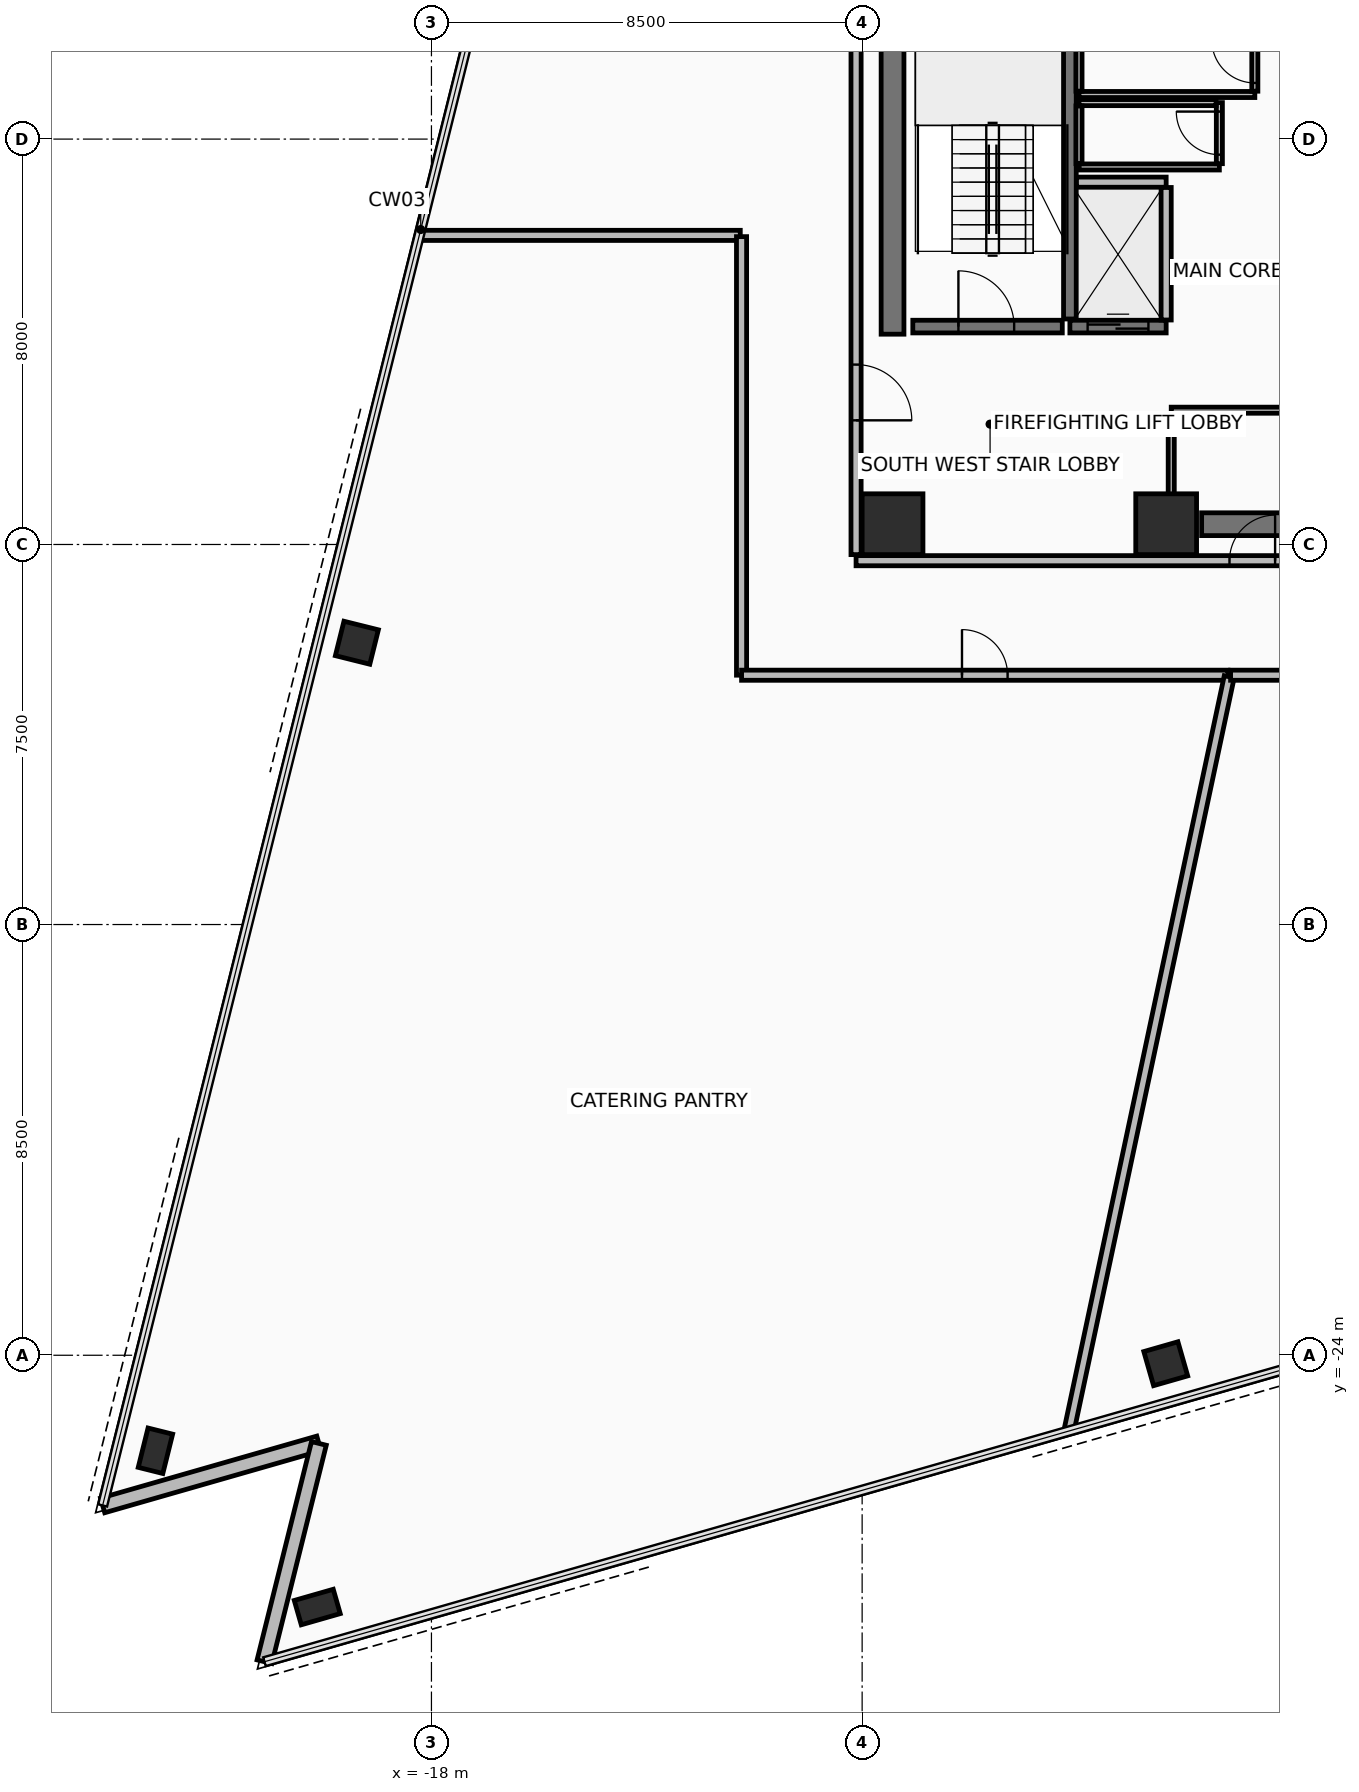
"""IFC4 building model, lengths in metres.
Left out: names, types, materials, properties, quantities, classifications, styles, units other than length and angle.
Written with IfcOpenShell. Run it as: python <this file> out.ifc"""

import sys

from ifc_helpers import new_model, si_unit, direction, frame, frame_2d, origin, origin_2d, place, context, subcontext, project, spatial, rectangle, hollow_rectangle, extrude, element, fill, save


model = new_model("IFC4")
c1 = context("Model", 3, precision=1e-05, world=origin(), true_north=direction((0.0, 1.0)))
c2 = subcontext(c1, "Body", "Model", "MODEL_VIEW")
j1 = project(units=[si_unit("LENGTHUNIT", "METRE"), si_unit("PLANEANGLEUNIT", "RADIAN")], contexts=[c1])
p1 = place(None, origin())
s1 = spatial("IfcSite", under=j1, at=p1, CompositionType="ELEMENT")
p2 = place(p1, origin())
s2 = spatial("IfcBuilding", under=s1, at=p2, CompositionType="ELEMENT")
p3 = place(p2, frame((0.0, 0.0, 104.1)))
s3 = spatial("IfcBuildingStorey", under=s2, at=p3, CompositionType="ELEMENT", Elevation=104.1)
for number, where, z_axis, x_axis in (
    (1, (-8.9, -7.6, 0.0), (0.0, 0.0, 1.0), (1.0, 0.0, 0.0)),
    (2, (-3.5, -7.6, 0.0), (0.0, 0.0, 1.0), (1.0, 0.0, 0.0)),
):
    element("IfcColumn", number, at=place(p3, frame(where, z_axis=z_axis, x_axis=x_axis)), inside=s3, PredefinedType="COLUMN", context=c2, shape_type="SweptSolid", body=[
        extrude(rectangle(XDim=1.2, YDim=1.2, at=origin_2d()), origin(), (0.0, 0.0, 1.0), 3.6),
    ])
p4 = place(p3, frame((-19.472, -9.939, 0.0), z_axis=(0.0, 0.0, 1.0), x_axis=(0.2419218956, 0.970295726276, 0.0)))
e3 = element("IfcColumn", 3, at=p4, inside=s3, PredefinedType="COLUMN", context=c2, shape_type="SweptSolid", body=[
    extrude(hollow_rectangle(XDim=0.7, YDim=0.7, WallThickness=0.04, at=origin_2d()), origin(), (0.0, 0.0, 1.0), 3.6),
])
for number, where, z_axis, x_axis in (
    (4, (-23.447, -25.885, 0.0), (0.0, 0.0, 1.0), (0.242, 0.97, 0.0)),
    (5, (-20.253, -28.969, 0.0), (0.0, 0.0, 1.0), (0.961, 0.276, 0.0)),
):
    element("IfcColumn", number, at=place(p3, frame(where, z_axis=z_axis, x_axis=x_axis)), inside=s3, PredefinedType="COLUMN", context=c2, shape_type="SweptSolid", body=[
        extrude(hollow_rectangle(XDim=0.5, YDim=0.8, WallThickness=0.04, at=origin_2d()), origin(), (0.0, 0.0, 1.0), 3.6),
    ])
p5 = place(p3, frame((-3.508, -24.167, 0.0), z_axis=(0.0, 0.0, 1.0), x_axis=(0.961261695938, 0.275637355817, 0.0)))
e6 = element("IfcColumn", 6, at=p5, inside=s3, PredefinedType="COLUMN", context=c2, shape_type="SweptSolid", body=[
    extrude(hollow_rectangle(XDim=0.7, YDim=0.7, WallThickness=0.04, at=origin_2d()), origin(), (0.0, 0.0, 1.0), 3.6),
])
p6 = place(p3, frame((-24.489, -26.964, 0.0), z_axis=(0.0, 0.0, 1.0), x_axis=(0.961259988927, 0.275643308803, 0.0)))
e7 = element("IfcWall", 7, at=p6, inside=s3, PredefinedType="STANDARD", context=c2, shape_type="SweptSolid", body=[
    extrude(rectangle(XDim=4.44, YDim=0.3, at=frame_2d((2.22, 0.0))), origin(), (0.0, 0.0, 1.0), 2.605),
])
p7 = place(p3, frame((-20.221, -25.74, 0.0), z_axis=(0.0, 0.0, 1.0), x_axis=(-0.241940431812, -0.970291104491, 0.0)))
e8 = element("IfcWall", 8, at=p7, inside=s3, PredefinedType="STANDARD", context=c2, shape_type="SweptSolid", body=[
    extrude(rectangle(XDim=4.44, YDim=0.3, at=frame_2d((2.22, 0.0))), origin(), (0.0, 0.0, 1.0), 2.605),
])
p8 = place(p3, frame((-2.8, -7.6, 0.0), z_axis=(0.0, 0.0, 1.0), x_axis=(1.0, 0.0, 0.0)))
e9 = element("IfcWall", 9, at=p8, inside=s3, PredefinedType="SHEAR", context=c2, shape_type="SweptSolid", body=[
    extrude(rectangle(XDim=5.38, YDim=0.45, at=frame_2d((2.69, 0.0))), origin(), (0.0, 0.0, 1.0), 3.41),
])
p9 = place(p3, frame((-8.9, -3.85, 0.0), z_axis=(0.0, 0.0, 1.0), x_axis=(0.0, 1.0, 0.0)))
e10 = element("IfcWall", 10, at=p9, inside=s3, PredefinedType="SHEAR", context=c2, shape_type="SweptSolid", body=[
    extrude(rectangle(XDim=10.7, YDim=0.45, at=frame_2d((5.35, 0.0))), origin(), (0.0, 0.0, 1.0), 3.41),
])
p10 = place(p3, frame((-9.62, -8.32, 0.0), z_axis=(0.0, 0.0, 1.0), x_axis=(1.0, 0.0, 0.0)))
e11 = element("IfcWall", 11, at=p10, inside=s3, PredefinedType="PARTITIONING", context=c2, shape_type="SweptSolid", body=[
    extrude(rectangle(XDim=19.24, YDim=0.2, at=frame_2d((9.62, 0.0))), origin(), (0.0, 0.0, 1.0), 2.805),
])
p11 = place(p10, frame((7.37, 0.0, 0.0)))
e12 = element("IfcOpeningElement", 12, at=p11, cuts=e11, PredefinedType="OPENING", context=c2, shape_type="SweptSolid", body=[
    extrude(rectangle(XDim=0.9, YDim=2.1, at=frame_2d((0.45, 1.05))), frame((0.0, 0.11, 0.0), z_axis=(0.0, -1.0, 0.0), x_axis=(1.0, 0.0, 0.0)), (0.0, 0.0, 1.0), 0.22),
])
p12 = place(p10, frame((10.77, 0.0, 0.0)))
e13 = element("IfcOpeningElement", 13, at=p12, cuts=e11, PredefinedType="OPENING", context=c2, shape_type="SweptSolid", body=[
    extrude(rectangle(XDim=0.9, YDim=2.1, at=frame_2d((0.45, 1.05))), frame((0.0, 0.11, 0.0), z_axis=(0.0, -1.0, 0.0), x_axis=(1.0, 0.0, 0.0)), (0.0, 0.0, 1.0), 0.22),
])
p13 = place(p3, frame((-9.62, 8.2, 0.0), z_axis=(0.0, 0.0, 1.0), x_axis=(0.0, -1.0, 0.0)))
e14 = element("IfcWall", 14, at=p13, inside=s3, PredefinedType="PARTITIONING", context=c2, shape_type="SweptSolid", body=[
    extrude(rectangle(XDim=16.4, YDim=0.2, at=frame_2d((8.2, 0.0))), origin(), (0.0, 0.0, 1.0), 2.805),
])
p14 = place(p13, frame((12.65, 0.0, 0.0)))
e15 = element("IfcOpeningElement", 15, at=p14, cuts=e14, PredefinedType="OPENING", context=c2, shape_type="SweptSolid", body=[
    extrude(rectangle(XDim=1.1, YDim=2.15, at=frame_2d((0.55, 1.075))), frame((0.0, 0.11, 0.0), z_axis=(0.0, -1.0, 0.0), x_axis=(1.0, 0.0, 0.0)), (0.0, 0.0, 1.0), 0.22),
])
p15 = place(p3, frame((-5.4, -3.55, 0.0), z_axis=(0.0, 0.0, 1.0), x_axis=(0.0, 1.0, 0.0)))
e16 = element("IfcWall", 16, at=p15, inside=s3, PredefinedType="SHEAR", context=c2, shape_type="SweptSolid", body=[
    extrude(rectangle(XDim=7.3, YDim=0.25, at=frame_2d((3.65, 0.0))), origin(), (0.0, 0.0, 1.0), 3.41),
])
p16 = place(p3, frame((-8.5, -3.7, 0.0), z_axis=(0.0, 0.0, 1.0), x_axis=(1.0, 0.0, 0.0)))
e17 = element("IfcWall", 17, at=p16, inside=s3, PredefinedType="SHEAR", context=c2, shape_type="SweptSolid", body=[
    extrude(rectangle(XDim=2.95, YDim=0.25, at=frame_2d((1.475, 0.0))), origin(), (0.0, 0.0, 1.0), 3.41),
])
p17 = place(p16, frame((0.9, 0.0, 0.0)))
e18 = element("IfcOpeningElement", 18, at=p17, cuts=e17, PredefinedType="OPENING", context=c2, shape_type="SweptSolid", body=[
    extrude(rectangle(XDim=1.1, YDim=2.15, at=frame_2d((0.55, 1.075))), frame((0.0, 0.135, 0.0), z_axis=(0.0, -1.0, 0.0), x_axis=(1.0, 0.0, 0.0)), (0.0, 0.0, 1.0), 0.27),
])
p18 = place(p3, frame((-5.4, -3.7, 0.0), z_axis=(0.0, 0.0, 1.0), x_axis=(1.0, 0.0, 0.0)))
e19 = element("IfcWall", 19, at=p18, inside=s3, PredefinedType="SHEAR", context=c2, shape_type="SweptSolid", body=[
    extrude(rectangle(XDim=1.9, YDim=0.25, at=frame_2d((0.95, 0.0))), origin(), (0.0, 0.0, 1.0), 3.41),
])
p19 = place(p18, frame((0.35, 0.0, 0.0)))
e20 = element("IfcOpeningElement", 20, at=p19, cuts=e19, PredefinedType="OPENING", context=c2, shape_type="SweptSolid", body=[
    extrude(rectangle(XDim=1.2, YDim=2.2, at=frame_2d((0.6, 1.1))), frame((0.0, 0.135, 0.0), z_axis=(0.0, -1.0, 0.0), x_axis=(1.0, 0.0, 0.0)), (0.0, 0.0, 1.0), 0.27),
])
p20 = place(p3, frame((-5.27, -0.85, 0.0), z_axis=(0.0, 0.0, 1.0), x_axis=(1.0, 0.0, 0.0)))
e21 = element("IfcWall", 21, at=p20, inside=s3, PredefinedType="PARTITIONING", context=c2, shape_type="SweptSolid", body=[
    extrude(rectangle(XDim=1.77, YDim=0.2, at=frame_2d((0.885, 0.0))), origin(), (0.0, 0.0, 1.0), 3.41),
])
p21 = place(p3, frame((-3.5, -3.57, 0.0), z_axis=(0.0, 0.0, 1.0), x_axis=(0.0, 1.0, 0.0)))
e22 = element("IfcWall", 22, at=p21, inside=s3, PredefinedType="PARTITIONING", context=c2, shape_type="SweptSolid", body=[
    extrude(rectangle(XDim=2.615, YDim=0.2, at=frame_2d((1.308, 0.0))), origin(), (0.0, 0.0, 1.0), 3.41),
])
p22 = place(p3, frame((-5.22, 0.88, 0.0), z_axis=(0.0, 0.0, 1.0), x_axis=(1.0, 0.0, 0.0)))
e23 = element("IfcWall", 23, at=p22, inside=s3, PredefinedType="PARTITIONING", context=c2, shape_type="SweptSolid", body=[
    extrude(rectangle(XDim=3.47, YDim=0.12, at=frame_2d((1.735, 0.0))), origin(), (0.0, 0.0, 1.0), 3.41),
])
p23 = place(p3, frame((-1.75, 0.945, 0.0), z_axis=(0.0, 0.0, 1.0), x_axis=(0.0, 1.0, 0.0)))
e24 = element("IfcWall", 24, at=p23, inside=s3, PredefinedType="PARTITIONING", context=c2, shape_type="SweptSolid", body=[
    extrude(rectangle(XDim=1.175, YDim=0.12, at=frame_2d((0.587, 0.0))), origin(), (0.0, 0.0, 1.0), 3.41),
])
p24 = place(p23, frame((0.163, 0.0, 0.0)))
e25 = element("IfcOpeningElement", 25, at=p24, cuts=e24, PredefinedType="OPENING", context=c2, shape_type="SweptSolid", body=[
    extrude(rectangle(XDim=0.85, YDim=2.1, at=frame_2d((0.425, 1.05))), frame((0.0, 0.07, 0.0), z_axis=(0.0, -1.0, 0.0), x_axis=(1.0, 0.0, 0.0)), (0.0, 0.0, 1.0), 0.14),
])
p25 = place(p3, frame((-5.22, 2.055, 0.0), z_axis=(0.0, 0.0, 1.0), x_axis=(0.0, -1.0, 0.0)))
e26 = element("IfcWall", 26, at=p25, inside=s3, PredefinedType="PARTITIONING", context=c2, shape_type="SweptSolid", body=[
    extrude(rectangle(XDim=1.11, YDim=0.12, at=frame_2d((0.555, 0.0))), origin(), (0.0, 0.0, 1.0), 3.41),
])
p26 = place(p3, frame((-5.22, -0.55, 0.0), z_axis=(0.0, 0.0, 1.0), x_axis=(1.0, 0.0, 0.0)))
e27 = element("IfcWall", 27, at=p26, inside=s3, PredefinedType="PARTITIONING", context=c2, shape_type="SweptSolid", body=[
    extrude(rectangle(XDim=2.77, YDim=0.12, at=frame_2d((1.385, 0.0))), origin(), (0.0, 0.0, 1.0), 3.41),
])
p27 = place(p3, frame((-2.45, -0.485, 0.0), z_axis=(0.0, 0.0, 1.0), x_axis=(0.0, 1.0, 0.0)))
e28 = element("IfcWall", 28, at=p27, inside=s3, PredefinedType="PARTITIONING", context=c2, shape_type="SweptSolid", body=[
    extrude(rectangle(XDim=1.205, YDim=0.12, at=frame_2d((0.603, 0.0))), origin(), (0.0, 0.0, 1.0), 3.41),
])
p28 = place(p27, frame((0.178, 0.0, 0.0)))
e29 = element("IfcOpeningElement", 29, at=p28, cuts=e28, PredefinedType="OPENING", context=c2, shape_type="SweptSolid", body=[
    extrude(rectangle(XDim=0.85, YDim=2.1, at=frame_2d((0.425, 1.05))), frame((0.0, 0.07, 0.0), z_axis=(0.0, -1.0, 0.0), x_axis=(1.0, 0.0, 0.0)), (0.0, 0.0, 1.0), 0.14),
])
p29 = place(p3, frame((-2.515, 0.72, 0.0), z_axis=(0.0, 0.0, 1.0), x_axis=(-1.0, 0.0, 0.0)))
e30 = element("IfcWall", 30, at=p29, inside=s3, PredefinedType="PARTITIONING", context=c2, shape_type="SweptSolid", body=[
    extrude(rectangle(XDim=2.705, YDim=0.12, at=frame_2d((1.353, 0.0))), origin(), (0.0, 0.0, 1.0), 3.41),
])
p30 = place(p3, frame((-5.22, 0.655, 0.0), z_axis=(0.0, 0.0, 1.0), x_axis=(0.0, -1.0, 0.0)))
e31 = element("IfcWall", 31, at=p30, inside=s3, PredefinedType="PARTITIONING", context=c2, shape_type="SweptSolid", body=[
    extrude(rectangle(XDim=1.14, YDim=0.12, at=frame_2d((0.57, 0.0))), origin(), (0.0, 0.0, 1.0), 3.41),
])
p31 = place(p3, frame((-0.265, -5.35, 0.0), z_axis=(0.0, 0.0, 1.0), x_axis=(-1.0, 0.0, 0.0)))
e32 = element("IfcWall", 32, at=p31, inside=s3, PredefinedType="PARTITIONING", context=c2, shape_type="SweptSolid", body=[
    extrude(rectangle(XDim=3.135, YDim=0.12, at=frame_2d((1.567, 0.0))), origin(), (0.0, 0.0, 1.0), 2.605),
])
p32 = place(p3, frame((-3.4, -5.415, 0.0), z_axis=(0.0, 0.0, 1.0), x_axis=(0.0, -1.0, 0.0)))
e33 = element("IfcWall", 33, at=p32, inside=s3, PredefinedType="PARTITIONING", context=c2, shape_type="SweptSolid", body=[
    extrude(rectangle(XDim=2.8, YDim=0.12, at=frame_2d((1.4, 0.0))), origin(), (0.0, 0.0, 1.0), 2.605),
])
p33 = place(p3, frame((-18.24, -1.9, 0.0), z_axis=(0.0, 0.0, 1.0), x_axis=(1.0, 0.0, 0.0)))
e34 = element("IfcWall", 34, at=p33, inside=s3, PredefinedType="PARTITIONING", context=c2, shape_type="SweptSolid", body=[
    extrude(rectangle(XDim=6.335, YDim=0.2, at=frame_2d((3.167, 0.0))), origin(), (0.0, 0.0, 1.0), 2.605),
])
p34 = place(p3, frame((-11.88, -1.925, 0.0), z_axis=(0.0, 0.0, 1.0), x_axis=(0.0, -1.0, 0.0)))
e35 = element("IfcWall", 35, at=p34, inside=s3, PredefinedType="PARTITIONING", context=c2, shape_type="SweptSolid", body=[
    extrude(rectangle(XDim=8.654, YDim=0.2, at=frame_2d((4.327, 0.0))), origin(), (0.0, 0.0, 1.0), 2.805),
])
p35 = place(p3, frame((-11.879, -10.58, 0.0), z_axis=(0.0, 0.0, 1.0), x_axis=(1.0, 0.0, 0.0)))
e36 = element("IfcWall", 36, at=p35, inside=s3, PredefinedType="PARTITIONING", context=c2, shape_type="SweptSolid", body=[
    extrude(rectangle(XDim=9.6, YDim=0.2, at=frame_2d((4.8, 0.0))), origin(), (0.0, 0.0, 1.0), 2.805),
])
p36 = place(p35, frame((4.35, 0.0, 0.0)))
e37 = element("IfcOpeningElement", 37, at=p36, cuts=e36, PredefinedType="OPENING", context=c2, shape_type="SweptSolid", body=[
    extrude(rectangle(XDim=0.9, YDim=2.1, at=frame_2d((0.45, 1.05))), frame((0.0, 0.11, 0.0), z_axis=(0.0, -1.0, 0.0), x_axis=(1.0, 0.0, 0.0)), (0.0, 0.0, 1.0), 0.22),
])
p37 = place(p3, frame((-2.255, -10.61, 0.0), z_axis=(0.0, 0.0, 1.0), x_axis=(-0.207899089065, -0.978150279234, 0.0)))
e38 = element("IfcWall", 38, at=p37, inside=s3, PredefinedType="PARTITIONING", context=c2, shape_type="SweptSolid", body=[
    extrude(rectangle(XDim=15.203, YDim=0.2, at=frame_2d((7.602, 0.0))), origin(), (0.0, 0.0, 1.0), 2.605),
])
p38 = place(p3, frame((-2.229, -10.58, 0.0), z_axis=(0.0, 0.0, 1.0), x_axis=(1.0, 0.0, 0.0)))
e39 = element("IfcWall", 39, at=p38, inside=s3, PredefinedType="PARTITIONING", context=c2, shape_type="SweptSolid", body=[
    extrude(rectangle(XDim=14.108, YDim=0.2, at=frame_2d((7.054, 0.0))), origin(), (0.0, 0.0, 1.0), 2.805),
])
p39 = place(p38, frame((6.554, 0.0, 0.0)))
e40 = element("IfcOpeningElement", 40, at=p39, cuts=e39, PredefinedType="OPENING", context=c2, shape_type="SweptSolid", body=[
    extrude(rectangle(XDim=1.0, YDim=2.15, at=frame_2d((0.5, 1.075))), frame((0.0, 0.11, 0.0), z_axis=(0.0, -1.0, 0.0), x_axis=(1.0, 0.0, 0.0)), (0.0, 0.0, 1.0), 0.22),
])
p40 = place(p14, frame((1.1, 0.0, 0.0), z_axis=(0.0, 0.0, 1.0), x_axis=(-1.0, 0.0, 0.0)))
e41 = element("IfcDoor", 41, at=p40, inside=s3, OperationType="SINGLE_SWING_LEFT", PredefinedType="DOOR", context=c2, shape_type="SweptSolid", body=[
    extrude(rectangle(XDim=1.1, YDim=2.15, at=frame_2d((0.55, 1.075))), frame((0.0, 0.025, 0.0), z_axis=(0.0, -1.0, 0.0), x_axis=(1.0, 0.0, 0.0)), (0.0, 0.0, 1.0), 0.05),
])
fill(e15, e41)
p41 = place(p17, origin())
e42 = element("IfcDoor", 42, at=p41, inside=s3, OperationType="SINGLE_SWING_LEFT", PredefinedType="DOOR", context=c2, shape_type="SweptSolid", body=[
    extrude(rectangle(XDim=1.1, YDim=2.15, at=frame_2d((0.55, 1.075))), frame((0.0, 0.025, 0.0), z_axis=(0.0, -1.0, 0.0), x_axis=(1.0, 0.0, 0.0)), (0.0, 0.0, 1.0), 0.05),
])
fill(e18, e42)
p42 = place(p19, origin())
e43 = element("IfcDoor", 43, at=p42, inside=s3, OperationType="SLIDING_TO_RIGHT", PredefinedType="DOOR", context=c2, shape_type="SweptSolid", body=[
    extrude(rectangle(XDim=1.2, YDim=2.2, at=frame_2d((0.6, 1.1))), frame((0.0, 0.025, 0.0), z_axis=(0.0, -1.0, 0.0), x_axis=(1.0, 0.0, 0.0)), (0.0, 0.0, 1.0), 0.05),
])
fill(e20, e43)
p43 = place(p24, frame((0.85, 0.0, 0.0), z_axis=(0.0, 0.0, 1.0), x_axis=(-1.0, 0.0, 0.0)))
e44 = element("IfcDoor", 44, at=p43, inside=s3, OperationType="SINGLE_SWING_RIGHT", PredefinedType="DOOR", context=c2, shape_type="SweptSolid", body=[
    extrude(rectangle(XDim=0.85, YDim=2.1, at=frame_2d((0.425, 1.05))), frame((0.0, 0.025, 0.0), z_axis=(0.0, -1.0, 0.0), x_axis=(1.0, 0.0, 0.0)), (0.0, 0.0, 1.0), 0.05),
])
fill(e25, e44)
p44 = place(p28, frame((0.85, 0.0, 0.0), z_axis=(0.0, 0.0, 1.0), x_axis=(-1.0, 0.0, 0.0)))
e45 = element("IfcDoor", 45, at=p44, inside=s3, OperationType="SINGLE_SWING_RIGHT", PredefinedType="DOOR", context=c2, shape_type="SweptSolid", body=[
    extrude(rectangle(XDim=0.85, YDim=2.1, at=frame_2d((0.425, 1.05))), frame((0.0, 0.025, 0.0), z_axis=(0.0, -1.0, 0.0), x_axis=(1.0, 0.0, 0.0)), (0.0, 0.0, 1.0), 0.05),
])
fill(e29, e45)
p45 = place(p11, frame((0.9, 0.0, 0.0), z_axis=(0.0, 0.0, 1.0), x_axis=(-1.0, 0.0, 0.0)))
e46 = element("IfcDoor", 46, at=p45, inside=s3, OperationType="SINGLE_SWING_LEFT", PredefinedType="DOOR", context=c2, shape_type="SweptSolid", body=[
    extrude(rectangle(XDim=0.9, YDim=2.1, at=frame_2d((0.45, 1.05))), frame((0.0, 0.025, 0.0), z_axis=(0.0, -1.0, 0.0), x_axis=(1.0, 0.0, 0.0)), (0.0, 0.0, 1.0), 0.05),
])
fill(e12, e46)
p46 = place(p36, origin())
e47 = element("IfcDoor", 47, at=p46, inside=s3, OperationType="SINGLE_SWING_LEFT", PredefinedType="DOOR", context=c2, shape_type="SweptSolid", body=[
    extrude(rectangle(XDim=0.9, YDim=2.1, at=frame_2d((0.45, 1.05))), frame((0.0, 0.025, 0.0), z_axis=(0.0, -1.0, 0.0), x_axis=(1.0, 0.0, 0.0)), (0.0, 0.0, 1.0), 0.05),
])
fill(e37, e47)
save(model, sys.argv[1])
